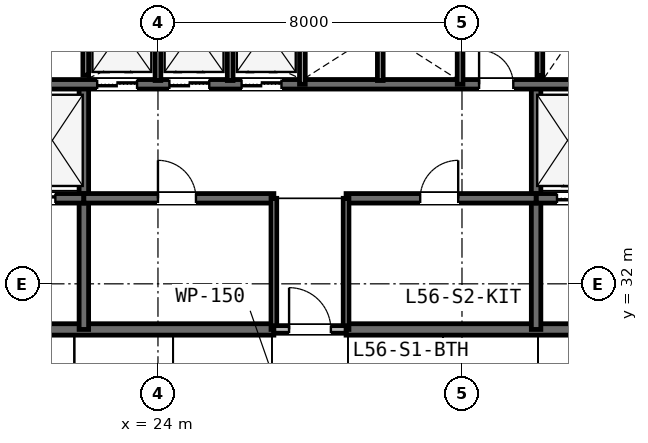
"""IFC4 building model, lengths in metres.
Left out: names, types, materials, properties, quantities, classifications, styles, units other than length and angle.
Written with IfcOpenShell. Run it as: python <this file> out.ifc"""

import sys

from ifc_helpers import new_model, si_unit, direction, frame, frame_2d, origin, place, context, subcontext, project, spatial, rectangle, extrude, element, fill, save


model = new_model("IFC4")
c1 = context("Model", 3, precision=1e-05, world=origin(), true_north=direction((0.0, 1.0)))
c2 = subcontext(c1, "Body", "Model", "MODEL_VIEW")
j1 = project(units=[si_unit("LENGTHUNIT", "METRE"), si_unit("PLANEANGLEUNIT", "RADIAN")], contexts=[c1])
p1 = place(None, origin())
s1 = spatial("IfcSite", under=j1, at=p1, CompositionType="ELEMENT")
p2 = place(p1, origin())
s2 = spatial("IfcBuilding", under=s1, at=p2, CompositionType="ELEMENT")
p3 = place(p2, frame((0.0, 0.0, 218.4)))
s3 = spatial("IfcBuildingStorey", under=s2, at=p3, CompositionType="ELEMENT", Elevation=218.4)
p4 = place(p3, frame((15.85, 30.8, 0.0), z_axis=(0.0, 0.0, 1.0), x_axis=(1.0, 0.0, 0.0)))
e1 = element("IfcWall", 1, at=p4, inside=s3, PredefinedType="SHEAR", context=c2, shape_type="SweptSolid", body=[
    extrude(rectangle(XDim=11.2, YDim=0.3, at=frame_2d((5.6, 0.0))), origin(), (0.0, 0.0, 1.0), 3.8),
])
p5 = place(p4, frame((2.45, 0.0, 0.0)))
e2 = element("IfcOpeningElement", 2, at=p5, cuts=e1, PredefinedType="OPENING", context=c2, shape_type="SweptSolid", body=[
    extrude(rectangle(XDim=1.1, YDim=2.15, at=frame_2d((0.55, 1.075))), frame((0.0, 0.16, 0.0), z_axis=(0.0, -1.0, 0.0), x_axis=(1.0, 0.0, 0.0)), (0.0, 0.0, 1.0), 0.32),
])
p6 = place(p3, frame((28.95, 30.8, 0.0), z_axis=(0.0, 0.0, 1.0), x_axis=(1.0, 0.0, 0.0)))
e3 = element("IfcWall", 3, at=p6, inside=s3, PredefinedType="SHEAR", context=c2, shape_type="SweptSolid", body=[
    extrude(rectangle(XDim=11.2, YDim=0.3, at=frame_2d((5.6, 0.0))), origin(), (0.0, 0.0, 1.0), 3.8),
])
p7 = place(p6, frame((7.65, 0.0, 0.0)))
e4 = element("IfcOpeningElement", 4, at=p7, cuts=e3, PredefinedType="OPENING", context=c2, shape_type="SweptSolid", body=[
    extrude(rectangle(XDim=1.1, YDim=2.15, at=frame_2d((0.55, 1.075))), frame((0.0, 0.16, 0.0), z_axis=(0.0, -1.0, 0.0), x_axis=(1.0, 0.0, 0.0)), (0.0, 0.0, 1.0), 0.32),
])
for number, where, z_axis, x_axis in (
    (5, (22.05, 30.8, 0.0), (0.0, 0.0, 1.0), (0.0, 1.0, 0.0)),
    (6, (33.95, 30.8, 0.0), (0.0, 0.0, 1.0), (0.0, 1.0, 0.0)),
):
    element("IfcWall", number, at=place(p3, frame(where, z_axis=z_axis, x_axis=x_axis)), inside=s3, PredefinedType="SHEAR", context=c2, shape_type="SweptSolid", body=[
        extrude(rectangle(XDim=6.45, YDim=0.25, at=frame_2d((3.225, 0.0))), origin(), (0.0, 0.0, 1.0), 3.8),
    ])
p8 = place(p3, frame((16.0, 34.25, 0.0), z_axis=(0.0, 0.0, 1.0), x_axis=(1.0, 0.0, 0.0)))
e7 = element("IfcWall", 7, at=p8, inside=s3, PredefinedType="SHEAR", context=c2, shape_type="SweptSolid", body=[
    extrude(rectangle(XDim=6.05, YDim=0.25, at=frame_2d((3.025, 0.0))), origin(), (0.0, 0.0, 1.0), 3.8),
])
p9 = place(p8, frame((1.25, 0.0, 0.0)))
e8 = element("IfcOpeningElement", 8, at=p9, cuts=e7, PredefinedType="OPENING", context=c2, shape_type="SweptSolid", body=[
    extrude(rectangle(XDim=1.0, YDim=2.15, at=frame_2d((0.5, 1.075))), frame((0.0, 0.135, 0.0), z_axis=(0.0, -1.0, 0.0), x_axis=(1.0, 0.0, 0.0)), (0.0, 0.0, 1.0), 0.27),
])
p10 = place(p8, frame((4.2, 0.0, 0.0)))
e9 = element("IfcOpeningElement", 9, at=p10, cuts=e7, PredefinedType="OPENING", context=c2, shape_type="SweptSolid", body=[
    extrude(rectangle(XDim=1.1, YDim=2.15, at=frame_2d((0.55, 1.075))), frame((0.0, 0.135, 0.0), z_axis=(0.0, -1.0, 0.0), x_axis=(1.0, 0.0, 0.0)), (0.0, 0.0, 1.0), 0.27),
])
p11 = place(p3, frame((33.95, 34.25, 0.0), z_axis=(0.0, 0.0, 1.0), x_axis=(1.0, 0.0, 0.0)))
e10 = element("IfcWall", 10, at=p11, inside=s3, PredefinedType="SHEAR", context=c2, shape_type="SweptSolid", body=[
    extrude(rectangle(XDim=6.05, YDim=0.25, at=frame_2d((3.025, 0.0))), origin(), (0.0, 0.0, 1.0), 3.8),
])
p12 = place(p11, frame((3.7, 0.0, 0.0)))
e11 = element("IfcOpeningElement", 11, at=p12, cuts=e10, PredefinedType="OPENING", context=c2, shape_type="SweptSolid", body=[
    extrude(rectangle(XDim=1.0, YDim=2.15, at=frame_2d((0.5, 1.075))), frame((0.0, 0.135, 0.0), z_axis=(0.0, -1.0, 0.0), x_axis=(1.0, 0.0, 0.0)), (0.0, 0.0, 1.0), 0.27),
])
p13 = place(p11, frame((0.55, 0.0, 0.0)))
e12 = element("IfcOpeningElement", 12, at=p13, cuts=e10, PredefinedType="OPENING", context=c2, shape_type="SweptSolid", body=[
    extrude(rectangle(XDim=1.1, YDim=2.15, at=frame_2d((0.55, 1.075))), frame((0.0, 0.135, 0.0), z_axis=(0.0, -1.0, 0.0), x_axis=(1.0, 0.0, 0.0)), (0.0, 0.0, 1.0), 0.27),
])
p14 = place(p3, frame((22.05, 34.25, 0.0), z_axis=(0.0, 0.0, 1.0), x_axis=(1.0, 0.0, 0.0)))
e13 = element("IfcWall", 13, at=p14, inside=s3, PredefinedType="SHEAR", context=c2, shape_type="SweptSolid", body=[
    extrude(rectangle(XDim=5.0, YDim=0.25, at=frame_2d((2.5, 0.0))), origin(), (0.0, 0.0, 1.0), 3.8),
])
p15 = place(p14, frame((1.95, 0.0, 0.0)))
e14 = element("IfcOpeningElement", 14, at=p15, cuts=e13, PredefinedType="OPENING", context=c2, shape_type="SweptSolid", body=[
    extrude(rectangle(XDim=1.0, YDim=2.15, at=frame_2d((0.5, 1.075))), frame((0.0, 0.135, 0.0), z_axis=(0.0, -1.0, 0.0), x_axis=(1.0, 0.0, 0.0)), (0.0, 0.0, 1.0), 0.27),
])
p16 = place(p3, frame((28.95, 34.25, 0.0), z_axis=(0.0, 0.0, 1.0), x_axis=(1.0, 0.0, 0.0)))
e15 = element("IfcWall", 15, at=p16, inside=s3, PredefinedType="SHEAR", context=c2, shape_type="SweptSolid", body=[
    extrude(rectangle(XDim=5.0, YDim=0.25, at=frame_2d((2.5, 0.0))), origin(), (0.0, 0.0, 1.0), 3.8),
])
p17 = place(p16, frame((1.95, 0.0, 0.0)))
e16 = element("IfcOpeningElement", 16, at=p17, cuts=e15, PredefinedType="OPENING", context=c2, shape_type="SweptSolid", body=[
    extrude(rectangle(XDim=1.0, YDim=2.15, at=frame_2d((0.5, 1.075))), frame((0.0, 0.135, 0.0), z_axis=(0.0, -1.0, 0.0), x_axis=(1.0, 0.0, 0.0)), (0.0, 0.0, 1.0), 0.27),
])
p18 = place(p3, frame((19.9, 37.25, 0.0), z_axis=(0.0, 0.0, 1.0), x_axis=(1.0, 0.0, 0.0)))
e17 = element("IfcWall", 17, at=p18, inside=s3, PredefinedType="SHEAR", context=c2, shape_type="SweptSolid", body=[
    extrude(rectangle(XDim=16.2, YDim=0.25, at=frame_2d((8.1, 0.0))), origin(), (0.0, 0.0, 1.0), 3.8),
])
p19 = place(p18, frame((12.55, 0.0, 0.0)))
e18 = element("IfcOpeningElement", 18, at=p19, cuts=e17, PredefinedType="OPENING", context=c2, shape_type="SweptSolid", body=[
    extrude(rectangle(XDim=0.9, YDim=2.15, at=frame_2d((0.45, 1.075))), frame((0.0, 0.135, 0.0), z_axis=(0.0, -1.0, 0.0), x_axis=(1.0, 0.0, 0.0)), (0.0, 0.0, 1.0), 0.27),
])
p20 = place(p18, frame((2.5, 0.0, 0.0)))
e19 = element("IfcOpeningElement", 19, at=p20, cuts=e17, PredefinedType="OPENING", context=c2, shape_type="SweptSolid", body=[
    extrude(rectangle(XDim=1.05, YDim=2.15, at=frame_2d((0.525, 1.075))), frame((0.0, 0.135, 0.0), z_axis=(0.0, -1.0, 0.0), x_axis=(1.0, 0.0, 0.0)), (0.0, 0.0, 1.0), 0.27),
])
p21 = place(p18, frame((4.4, 0.0, 0.0)))
e20 = element("IfcOpeningElement", 20, at=p21, cuts=e17, PredefinedType="OPENING", context=c2, shape_type="SweptSolid", body=[
    extrude(rectangle(XDim=1.05, YDim=2.15, at=frame_2d((0.525, 1.075))), frame((0.0, 0.135, 0.0), z_axis=(0.0, -1.0, 0.0), x_axis=(1.0, 0.0, 0.0)), (0.0, 0.0, 1.0), 0.27),
])
p22 = place(p18, frame((6.3, 0.0, 0.0)))
e21 = element("IfcOpeningElement", 21, at=p22, cuts=e17, PredefinedType="OPENING", context=c2, shape_type="SweptSolid", body=[
    extrude(rectangle(XDim=1.05, YDim=2.15, at=frame_2d((0.525, 1.075))), frame((0.0, 0.135, 0.0), z_axis=(0.0, -1.0, 0.0), x_axis=(1.0, 0.0, 0.0)), (0.0, 0.0, 1.0), 0.27),
])
for number, where, z_axis, x_axis in (
    (22, (27.05, 30.8, 0.0), (0.0, 0.0, 1.0), (0.0, 1.0, 0.0)),
    (23, (28.95, 30.8, 0.0), (0.0, 0.0, 1.0), (0.0, 1.0, 0.0)),
):
    element("IfcWall", number, at=place(p3, frame(where, z_axis=z_axis, x_axis=x_axis)), inside=s3, PredefinedType="PLUMBINGWALL", context=c2, shape_type="SweptSolid", body=[
        extrude(rectangle(XDim=3.45, YDim=0.15, at=frame_2d((1.725, 0.0))), origin(), (0.0, 0.0, 1.0), 3.22),
    ])
p23 = place(p3, frame((27.05, 30.8, 0.0), z_axis=(0.0, 0.0, 1.0), x_axis=(1.0, 0.0, 0.0)))
e24 = element("IfcWall", 24, at=p23, inside=s3, PredefinedType="PARTITIONING", context=c2, shape_type="SweptSolid", body=[
    extrude(rectangle(XDim=1.9, YDim=0.2, at=frame_2d((0.95, 0.0))), origin(), (0.0, 0.0, 1.0), 3.22),
])
p24 = place(p23, frame((0.4, 0.0, 0.0)))
e25 = element("IfcOpeningElement", 25, at=p24, cuts=e24, PredefinedType="OPENING", context=c2, shape_type="SweptSolid", body=[
    extrude(rectangle(XDim=1.1, YDim=2.15, at=frame_2d((0.55, 1.075))), frame((0.0, 0.11, 0.0), z_axis=(0.0, -1.0, 0.0), x_axis=(1.0, 0.0, 0.0)), (0.0, 0.0, 1.0), 0.22),
])
p25 = place(p3, frame((22.1, 37.49, 0.0), z_axis=(0.0, 0.0, 1.0), x_axis=(0.0, 1.0, 0.0)))
e26 = element("IfcWall", 26, at=p25, inside=s3, PredefinedType="PLUMBINGWALL", context=c2, shape_type="SweptSolid", body=[
    extrude(rectangle(XDim=2.56, YDim=0.15, at=frame_2d((1.28, 0.0))), origin(), (0.0, 0.0, 1.0), 3.53),
])
p26 = place(p3, frame((27.8, 37.25, 0.0), z_axis=(0.0, 0.0, 1.0), x_axis=(0.0, 1.0, 0.0)))
e27 = element("IfcWall", 27, at=p26, inside=s3, PredefinedType="PLUMBINGWALL", context=c2, shape_type="SweptSolid", body=[
    extrude(rectangle(XDim=2.8, YDim=0.15, at=frame_2d((1.4, 0.0))), origin(), (0.0, 0.0, 1.0), 3.53),
])
for number, where, z_axis, x_axis in (
    (28, (24.0, 37.35, 0.0), (0.0, 0.0, 1.0), (0.0, 1.0, 0.0)),
    (29, (25.9, 37.35, 0.0), (0.0, 0.0, 1.0), (0.0, 1.0, 0.0)),
):
    element("IfcWall", number, at=place(p3, frame(where, z_axis=z_axis, x_axis=x_axis)), inside=s3, PredefinedType="PLUMBINGWALL", context=c2, shape_type="SweptSolid", body=[
        extrude(rectangle(XDim=2.6, YDim=0.15, at=frame_2d((1.3, 0.0))), origin(), (0.0, 0.0, 1.0), 3.53),
    ])
p27 = place(p3, frame((31.95, 37.25, 0.0), z_axis=(0.0, 0.0, 1.0), x_axis=(0.0, 1.0, 0.0)))
e30 = element("IfcWall", 30, at=p27, inside=s3, PredefinedType="PLUMBINGWALL", context=c2, shape_type="SweptSolid", body=[
    extrude(rectangle(XDim=2.8, YDim=0.15, at=frame_2d((1.4, 0.0))), origin(), (0.0, 0.0, 1.0), 3.53),
])
p28 = place(p3, frame((29.85, 37.35, 0.0), z_axis=(0.0, 0.0, 1.0), x_axis=(0.0, 1.0, 0.0)))
e31 = element("IfcWall", 31, at=p28, inside=s3, PredefinedType="PLUMBINGWALL", context=c2, shape_type="SweptSolid", body=[
    extrude(rectangle(XDim=2.6, YDim=0.15, at=frame_2d((1.3, 0.0))), origin(), (0.0, 0.0, 1.0), 3.53),
])
p29 = place(p3, frame((34.05, 37.473, 0.0), z_axis=(0.0, 0.0, 1.0), x_axis=(0.0, 1.0, 0.0)))
e32 = element("IfcWall", 32, at=p29, inside=s3, PredefinedType="PLUMBINGWALL", context=c2, shape_type="SweptSolid", body=[
    extrude(rectangle(XDim=2.577, YDim=0.15, at=frame_2d((1.288, 0.0))), origin(), (0.0, 0.0, 1.0), 3.53),
])
p30 = place(p24, origin())
e33 = element("IfcDoor", 33, at=p30, inside=s3, OperationType="SINGLE_SWING_LEFT", PredefinedType="DOOR", context=c2, shape_type="SweptSolid", body=[
    extrude(rectangle(XDim=1.1, YDim=2.15, at=frame_2d((0.55, 1.075))), frame((0.0, 0.025, 0.0), z_axis=(0.0, -1.0, 0.0), x_axis=(1.0, 0.0, 0.0)), (0.0, 0.0, 1.0), 0.05),
])
fill(e25, e33)
p31 = place(p15, origin())
e34 = element("IfcDoor", 34, at=p31, inside=s3, OperationType="SINGLE_SWING_LEFT", PredefinedType="DOOR", context=c2, shape_type="SweptSolid", body=[
    extrude(rectangle(XDim=1.0, YDim=2.15, at=frame_2d((0.5, 1.075))), frame((0.0, 0.025, 0.0), z_axis=(0.0, -1.0, 0.0), x_axis=(1.0, 0.0, 0.0)), (0.0, 0.0, 1.0), 0.05),
])
fill(e14, e34)
p32 = place(p17, origin())
e35 = element("IfcDoor", 35, at=p32, inside=s3, OperationType="SINGLE_SWING_RIGHT", PredefinedType="DOOR", context=c2, shape_type="SweptSolid", body=[
    extrude(rectangle(XDim=1.0, YDim=2.15, at=frame_2d((0.5, 1.075))), frame((0.0, 0.025, 0.0), z_axis=(0.0, -1.0, 0.0), x_axis=(1.0, 0.0, 0.0)), (0.0, 0.0, 1.0), 0.05),
])
fill(e16, e35)
p33 = place(p19, origin())
e36 = element("IfcDoor", 36, at=p33, inside=s3, OperationType="SINGLE_SWING_LEFT", PredefinedType="DOOR", context=c2, shape_type="SweptSolid", body=[
    extrude(rectangle(XDim=0.9, YDim=2.15, at=frame_2d((0.45, 1.075))), frame((0.0, 0.025, 0.0), z_axis=(0.0, -1.0, 0.0), x_axis=(1.0, 0.0, 0.0)), (0.0, 0.0, 1.0), 0.05),
])
fill(e18, e36)
p34 = place(p10, origin())
e37 = element("IfcDoor", 37, at=p34, inside=s3, OperationType="DOUBLE_DOOR_SLIDING", PredefinedType="DOOR", context=c2, shape_type="SweptSolid", body=[
    extrude(rectangle(XDim=1.1, YDim=2.15, at=frame_2d((0.55, 1.075))), frame((0.0, 0.025, 0.0), z_axis=(0.0, -1.0, 0.0), x_axis=(1.0, 0.0, 0.0)), (0.0, 0.0, 1.0), 0.05),
])
fill(e9, e37)
p35 = place(p13, origin())
e38 = element("IfcDoor", 38, at=p35, inside=s3, OperationType="DOUBLE_DOOR_SLIDING", PredefinedType="DOOR", context=c2, shape_type="SweptSolid", body=[
    extrude(rectangle(XDim=1.1, YDim=2.15, at=frame_2d((0.55, 1.075))), frame((0.0, 0.025, 0.0), z_axis=(0.0, -1.0, 0.0), x_axis=(1.0, 0.0, 0.0)), (0.0, 0.0, 1.0), 0.05),
])
fill(e12, e38)
p36 = place(p20, origin())
e39 = element("IfcDoor", 39, at=p36, inside=s3, OperationType="DOUBLE_DOOR_SLIDING", PredefinedType="DOOR", context=c2, shape_type="SweptSolid", body=[
    extrude(rectangle(XDim=1.05, YDim=2.15, at=frame_2d((0.525, 1.075))), frame((0.0, 0.025, 0.0), z_axis=(0.0, -1.0, 0.0), x_axis=(1.0, 0.0, 0.0)), (0.0, 0.0, 1.0), 0.05),
])
fill(e19, e39)
p37 = place(p21, origin())
e40 = element("IfcDoor", 40, at=p37, inside=s3, OperationType="DOUBLE_DOOR_SLIDING", PredefinedType="DOOR", context=c2, shape_type="SweptSolid", body=[
    extrude(rectangle(XDim=1.05, YDim=2.15, at=frame_2d((0.525, 1.075))), frame((0.0, 0.025, 0.0), z_axis=(0.0, -1.0, 0.0), x_axis=(1.0, 0.0, 0.0)), (0.0, 0.0, 1.0), 0.05),
])
fill(e20, e40)
p38 = place(p22, origin())
e41 = element("IfcDoor", 41, at=p38, inside=s3, OperationType="DOUBLE_DOOR_SLIDING", PredefinedType="DOOR", context=c2, shape_type="SweptSolid", body=[
    extrude(rectangle(XDim=1.05, YDim=2.15, at=frame_2d((0.525, 1.075))), frame((0.0, 0.025, 0.0), z_axis=(0.0, -1.0, 0.0), x_axis=(1.0, 0.0, 0.0)), (0.0, 0.0, 1.0), 0.05),
])
fill(e21, e41)
save(model, sys.argv[1])
